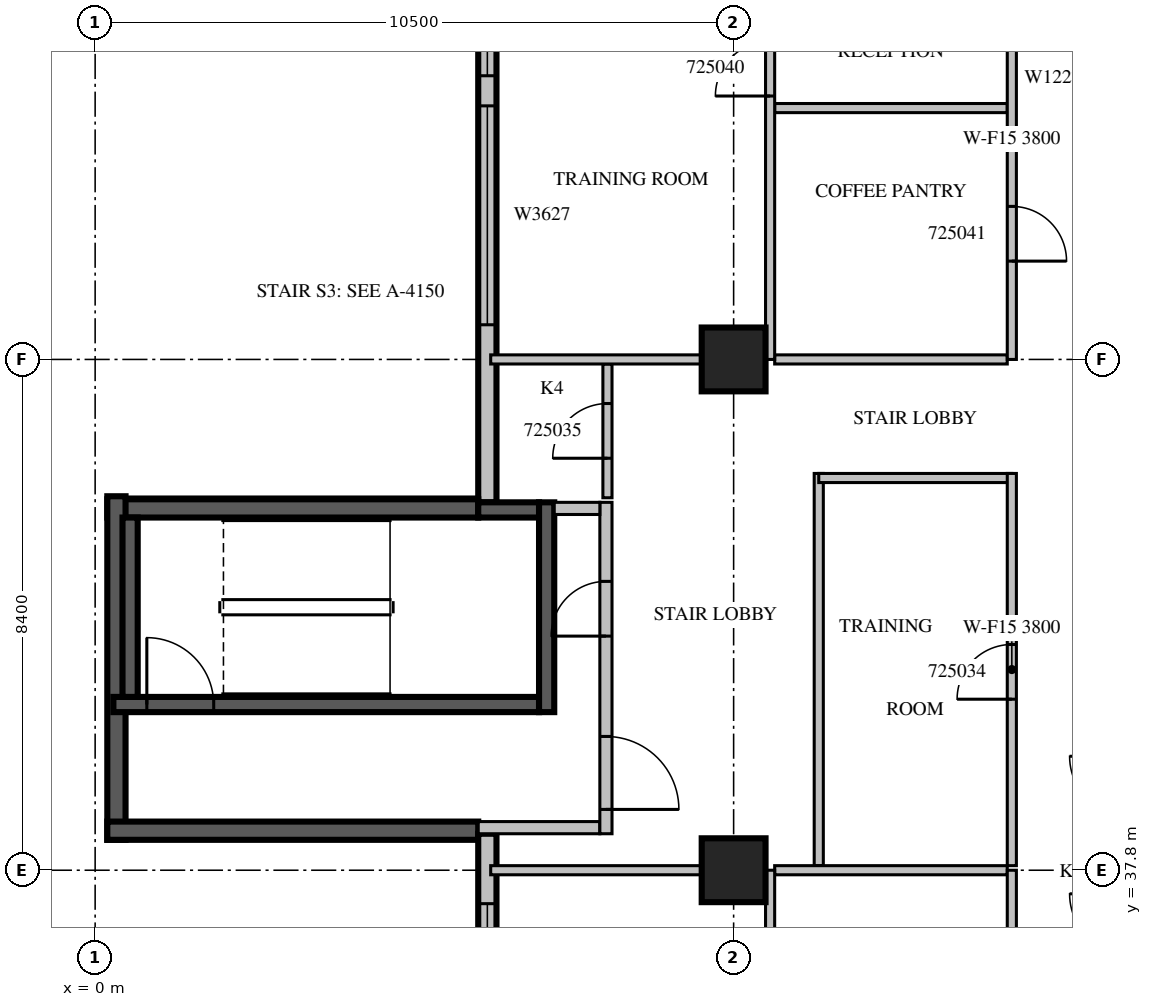
"""IFC4 building model, lengths in metres.
Left out: names, types, materials, properties, quantities, classifications, styles, units other than length and angle.
Written with IfcOpenShell. Run it as: python <this file> out.ifc"""

import sys

from ifc_helpers import new_model, si_unit, direction, frame, frame_2d, origin, origin_2d, place, context, subcontext, project, spatial, rectangle, extrude, source, transform, mapped, element, fill, save


model = new_model("IFC4")
c1 = context("Model", 3, precision=1e-05, world=origin(), true_north=direction((0.0, 1.0)))
c2 = subcontext(c1, "Body", "Model", "MODEL_VIEW")
j1 = project(units=[si_unit("LENGTHUNIT", "METRE"), si_unit("PLANEANGLEUNIT", "RADIAN")], contexts=[c1])
p1 = place(None, origin())
s1 = spatial("IfcSite", under=j1, at=p1, CompositionType="ELEMENT")
p2 = place(p1, origin())
s2 = spatial("IfcBuilding", under=s1, at=p2, CompositionType="ELEMENT")
p3 = place(p2, frame((0.0, 0.0, 116.1)))
s3 = spatial("IfcBuildingStorey", under=s2, at=p3, CompositionType="ELEMENT", Elevation=116.1)
m1 = source(origin(), c2, "Body", "SweptSolid", [
    extrude(rectangle(XDim=1.05, YDim=1.05, at=origin_2d()), origin(), (0.0, 0.0, 1.0), 4.2),
])
for number, where, z_axis, x_axis in (
    (1, (10.5, 37.8, 0.0), (0.0, 0.0, 1.0), (1.0, 0.0, 0.0)),
    (2, (10.5, 46.2, 0.0), (0.0, 0.0, 1.0), (1.0, 0.0, 0.0)),
):
    element("IfcColumn", number, at=place(p3, frame(where, z_axis=z_axis, x_axis=x_axis)), inside=s3, PredefinedType="COLUMN", context=c2, shape_type="MappedRepresentation", body=[
        mapped(m1, transform((0.0, 0.0, 0.0), scale=1.0)),
    ])
m2 = source(origin(), c2, "Body", "SweptSolid", [
    extrude(rectangle(XDim=9.91, YDim=0.3, at=frame_2d((4.955, 0.0))), origin(), (0.0, 0.0, 1.0), 3.8),
])
p4 = place(p3, frame((6.45, 53.76, 0.0), z_axis=(0.0, 0.0, 1.0), x_axis=(0.0, -1.0, 0.0)))
e3 = element("IfcWall", 3, at=p4, inside=s3, PredefinedType="STANDARD", context=c2, shape_type="MappedRepresentation", body=[
    mapped(m2, transform((0.0, 0.0, 0.0), scale=1.0)),
])
m3 = source(origin(), c2, "Body", "SweptSolid", [
    extrude(rectangle(XDim=3.6, YDim=2.7, at=frame_2d((1.8, 1.35))), frame((0.0, 0.16, 0.0), z_axis=(0.0, -1.0, 0.0), x_axis=(1.0, 0.0, 0.0)), (0.0, 0.0, 1.0), 0.32),
])
p5 = place(p4, frame((3.39, 0.0, 0.6)))
e4 = element("IfcOpeningElement", 4, at=p5, cuts=e3, PredefinedType="OPENING", context=c2, shape_type="MappedRepresentation", body=[
    mapped(m3, transform((0.0, 0.0, 0.0), scale=1.0)),
])
m4 = source(origin(), c2, "Body", "SweptSolid", [
    extrude(rectangle(XDim=2.4, YDim=2.7, at=frame_2d((1.2, 1.35))), frame((0.0, 0.16, 0.0), z_axis=(0.0, -1.0, 0.0), x_axis=(1.0, 0.0, 0.0)), (0.0, 0.0, 1.0), 0.32),
])
p6 = place(p4, frame((0.495, 0.0, 0.6)))
e5 = element("IfcOpeningElement", 5, at=p6, cuts=e3, PredefinedType="OPENING", context=c2, shape_type="MappedRepresentation", body=[
    mapped(m4, transform((0.0, 0.0, 0.0), scale=1.0)),
])
m5 = source(origin(), c2, "Body", "SweptSolid", [
    extrude(rectangle(XDim=6.1, YDim=0.3, at=frame_2d((3.05, 0.0))), origin(), (0.0, 0.0, 1.0), 3.8),
])
p7 = place(p3, frame((6.3, 43.75, 0.0), z_axis=(0.0, 0.0, 1.0), x_axis=(-1.0, 0.0, 0.0)))
e6 = element("IfcWall", 6, at=p7, inside=s3, PredefinedType="SOLIDWALL", context=c2, shape_type="MappedRepresentation", body=[
    mapped(m5, transform((0.0, 0.0, 0.0), scale=1.0)),
])
m6 = source(origin(), c2, "Body", "SweptSolid", [
    extrude(rectangle(XDim=5.65, YDim=0.3, at=frame_2d((2.825, 0.0))), origin(), (0.0, 0.0, 1.0), 3.8),
])
p8 = place(p3, frame((0.35, 43.95, 0.0), z_axis=(0.0, 0.0, 1.0), x_axis=(0.0, -1.0, 0.0)))
e7 = element("IfcWall", 7, at=p8, inside=s3, PredefinedType="SOLIDWALL", context=c2, shape_type="MappedRepresentation", body=[
    mapped(m6, transform((0.0, 0.0, 0.0), scale=1.0)),
])
p9 = place(p3, frame((0.2, 38.45, 0.0), z_axis=(0.0, 0.0, 1.0), x_axis=(1.0, 0.0, 0.0)))
e8 = element("IfcWall", 8, at=p9, inside=s3, PredefinedType="SOLIDWALL", context=c2, shape_type="MappedRepresentation", body=[
    mapped(m5, transform((0.0, 0.0, 0.0), scale=1.0)),
])
m7 = source(origin(), c2, "Body", "SweptSolid", [
    extrude(rectangle(XDim=16.4, YDim=0.3, at=frame_2d((8.2, 0.0))), origin(), (0.0, 0.0, 1.0), 3.8),
])
p10 = place(p3, frame((6.45, 38.4, 0.0), z_axis=(0.0, 0.0, 1.0), x_axis=(0.0, -1.0, 0.0)))
e9 = element("IfcWall", 9, at=p10, inside=s3, PredefinedType="STANDARD", context=c2, shape_type="MappedRepresentation", body=[
    mapped(m7, transform((0.0, 0.0, 0.0), scale=1.0)),
])
m8 = source(origin(), c2, "Body", "SweptSolid", [
    extrude(rectangle(XDim=1.8, YDim=2.7, at=frame_2d((0.9, 1.35))), frame((0.0, 0.16, 0.0), z_axis=(0.0, -1.0, 0.0), x_axis=(1.0, 0.0, 0.0)), (0.0, 0.0, 1.0), 0.32),
])
p11 = place(p10, frame((1.15, 0.0, 0.6)))
e10 = element("IfcOpeningElement", 10, at=p11, cuts=e9, PredefinedType="OPENING", context=c2, shape_type="MappedRepresentation", body=[
    mapped(m8, transform((0.0, 0.0, 0.0), scale=1.0)),
])
p12 = place(p10, frame((5.162, 0.0, 0.6)))
e11 = element("IfcOpeningElement", 11, at=p12, cuts=e9, PredefinedType="OPENING", context=c2, shape_type="MappedRepresentation", body=[
    mapped(m8, transform((0.0, 0.0, 0.0), scale=1.0)),
])
p13 = place(p10, frame((9.438, 0.0, 0.6)))
e12 = element("IfcOpeningElement", 12, at=p13, cuts=e9, PredefinedType="OPENING", context=c2, shape_type="MappedRepresentation", body=[
    mapped(m8, transform((0.0, 0.0, 0.0), scale=1.0)),
])
m9 = source(origin(), c2, "Body", "SweptSolid", [
    extrude(rectangle(XDim=3.0, YDim=2.7, at=frame_2d((1.5, 1.35))), frame((0.0, 0.16, 0.0), z_axis=(0.0, -1.0, 0.0), x_axis=(1.0, 0.0, 0.0)), (0.0, 0.0, 1.0), 0.32),
])
p14 = place(p10, frame((12.7, 0.0, 0.6)))
e13 = element("IfcOpeningElement", 13, at=p14, cuts=e9, PredefinedType="OPENING", context=c2, shape_type="MappedRepresentation", body=[
    mapped(m9, transform((0.0, 0.0, 0.0), scale=1.0)),
])
m10 = source(origin(), c2, "Body", "SweptSolid", [
    extrude(rectangle(XDim=7.0, YDim=0.25, at=frame_2d((3.5, 0.0))), origin(), (0.0, 0.0, 1.0), 3.8),
])
p15 = place(p3, frame((0.3, 40.525, 0.0), z_axis=(0.0, 0.0, 1.0), x_axis=(1.0, 0.0, 0.0)))
e14 = element("IfcWall", 14, at=p15, inside=s3, PredefinedType="SOLIDWALL", context=c2, shape_type="MappedRepresentation", body=[
    mapped(m10, transform((0.0, 0.0, 0.0), scale=1.0)),
])
m11 = source(origin(), c2, "Body", "SweptSolid", [
    extrude(rectangle(XDim=1.1, YDim=2.1, at=frame_2d((0.55, 1.05))), frame((0.0, 0.135, 0.0), z_axis=(0.0, -1.0, 0.0), x_axis=(1.0, 0.0, 0.0)), (0.0, 0.0, 1.0), 0.27),
])
p16 = place(p15, frame((0.55, 0.0, 0.0)))
e15 = element("IfcOpeningElement", 15, at=p16, cuts=e14, PredefinedType="OPENING", context=c2, shape_type="MappedRepresentation", body=[
    mapped(m11, transform((0.0, 0.0, 0.0), scale=1.0)),
])
m12 = source(origin(), c2, "Body", "SweptSolid", [
    extrude(rectangle(XDim=1.0, YDim=0.25, at=frame_2d((0.5, 0.0))), origin(), (0.0, 0.0, 1.0), 3.8),
])
p17 = place(p3, frame((6.3, 43.725, 0.0), z_axis=(0.0, 0.0, 1.0), x_axis=(1.0, 0.0, 0.0)))
e16 = element("IfcWall", 16, at=p17, inside=s3, PredefinedType="SOLIDWALL", context=c2, shape_type="MappedRepresentation", body=[
    mapped(m12, transform((0.0, 0.0, 0.0), scale=1.0)),
])
m13 = source(origin(), c2, "Body", "SweptSolid", [
    extrude(rectangle(XDim=3.45, YDim=0.25, at=frame_2d((1.725, 0.0))), origin(), (0.0, 0.0, 1.0), 3.8),
])
p18 = place(p3, frame((7.425, 40.4, 0.0), z_axis=(0.0, 0.0, 1.0), x_axis=(0.0, 1.0, 0.0)))
e17 = element("IfcWall", 17, at=p18, inside=s3, PredefinedType="SOLIDWALL", context=c2, shape_type="MappedRepresentation", body=[
    mapped(m13, transform((0.0, 0.0, 0.0), scale=1.0)),
])
m14 = source(origin(), c2, "Body", "SweptSolid", [
    extrude(rectangle(XDim=2.95, YDim=0.25, at=frame_2d((1.475, 0.0))), origin(), (0.0, 0.0, 1.0), 3.8),
])
p19 = place(p3, frame((0.575, 40.65, 0.0), z_axis=(0.0, 0.0, 1.0), x_axis=(0.0, 1.0, 0.0)))
e18 = element("IfcWall", 18, at=p19, inside=s3, PredefinedType="SOLIDWALL", context=c2, shape_type="MappedRepresentation", body=[
    mapped(m14, transform((0.0, 0.0, 0.0), scale=1.0)),
])
m15 = source(origin(), c2, "Body", "SweptSolid", [
    extrude(rectangle(XDim=2.0, YDim=0.2, at=frame_2d((1.0, 0.0))), origin(), (0.0, 0.0, 1.0), 3.8),
])
p20 = place(p3, frame((6.3, 38.5, 0.0), z_axis=(0.0, 0.0, 1.0), x_axis=(1.0, 0.0, 0.0)))
e19 = element("IfcWall", 19, at=p20, inside=s3, PredefinedType="PARTITIONING", context=c2, shape_type="MappedRepresentation", body=[
    mapped(m15, transform((0.0, 0.0, 0.0), scale=1.0)),
])
m16 = source(origin(), c2, "Body", "SweptSolid", [
    extrude(rectangle(XDim=5.45, YDim=0.2, at=frame_2d((2.725, 0.0))), origin(), (0.0, 0.0, 1.0), 3.8),
])
p21 = place(p3, frame((8.4, 38.4, 0.0), z_axis=(0.0, 0.0, 1.0), x_axis=(0.0, 1.0, 0.0)))
e20 = element("IfcWall", 20, at=p21, inside=s3, PredefinedType="PARTITIONING", context=c2, shape_type="MappedRepresentation", body=[
    mapped(m16, transform((0.0, 0.0, 0.0), scale=1.0)),
])
m17 = source(origin(), c2, "Body", "SweptSolid", [
    extrude(rectangle(XDim=1.2, YDim=2.1, at=frame_2d((0.6, 1.05))), frame((0.0, 0.11, 0.0), z_axis=(0.0, -1.0, 0.0), x_axis=(1.0, 0.0, 0.0)), (0.0, 0.0, 1.0), 0.22),
])
p22 = place(p21, frame((0.4, 0.0, 0.0)))
e21 = element("IfcOpeningElement", 21, at=p22, cuts=e20, PredefinedType="OPENING", context=c2, shape_type="MappedRepresentation", body=[
    mapped(m17, transform((0.0, 0.0, 0.0), scale=1.0)),
])
m18 = source(origin(), c2, "Body", "SweptSolid", [
    extrude(rectangle(XDim=0.9, YDim=2.1, at=frame_2d((0.45, 1.05))), frame((0.0, 0.11, 0.0), z_axis=(0.0, -1.0, 0.0), x_axis=(1.0, 0.0, 0.0)), (0.0, 0.0, 1.0), 0.22),
])
p23 = place(p21, frame((3.25, 0.0, 0.0)))
e22 = element("IfcOpeningElement", 22, at=p23, cuts=e20, PredefinedType="OPENING", context=c2, shape_type="MappedRepresentation", body=[
    mapped(m18, transform((0.0, 0.0, 0.0), scale=1.0)),
])
m19 = source(origin(), c2, "Body", "SweptSolid", [
    extrude(rectangle(XDim=0.75, YDim=0.2, at=frame_2d((0.375, 0.0))), origin(), (0.0, 0.0, 1.0), 3.8),
])
p24 = place(p3, frame((7.55, 43.75, 0.0), z_axis=(0.0, 0.0, 1.0), x_axis=(1.0, 0.0, 0.0)))
e23 = element("IfcWall", 23, at=p24, inside=s3, PredefinedType="PARTITIONING", context=c2, shape_type="MappedRepresentation", body=[
    mapped(m19, transform((0.0, 0.0, 0.0), scale=1.0)),
])
m20 = source(origin(), c2, "Body", "SweptSolid", [
    extrude(rectangle(XDim=6.45, YDim=0.15, at=frame_2d((3.225, 0.0))), origin(), (0.0, 0.0, 1.0), 3.8),
])
p25 = place(p3, frame((11.9, 44.325, 0.0), z_axis=(0.0, 0.0, 1.0), x_axis=(0.0, -1.0, 0.0)))
e24 = element("IfcWall", 24, at=p25, inside=s3, PredefinedType="PARTITIONING", context=c2, shape_type="MappedRepresentation", body=[
    mapped(m20, transform((0.0, 0.0, 0.0), scale=1.0)),
])
m21 = source(origin(), c2, "Body", "SweptSolid", [
    extrude(rectangle(XDim=3.175, YDim=0.15, at=frame_2d((1.587, 0.0))), origin(), (0.0, 0.0, 1.0), 3.8),
])
p26 = place(p3, frame((15.075, 44.25, 0.0), z_axis=(0.0, 0.0, 1.0), x_axis=(-1.0, 0.0, 0.0)))
e25 = element("IfcWall", 25, at=p26, inside=s3, PredefinedType="PARTITIONING", context=c2, shape_type="MappedRepresentation", body=[
    mapped(m21, transform((0.0, 0.0, 0.0), scale=1.0)),
])
p27 = place(p3, frame((15.075, 37.875, 0.0), z_axis=(0.0, 0.0, 1.0), x_axis=(0.0, 1.0, 0.0)))
e26 = element("IfcWall", 26, at=p27, inside=s3, PredefinedType="PARTITIONING", context=c2, shape_type="MappedRepresentation", body=[
    mapped(m20, transform((0.0, 0.0, 0.0), scale=1.0)),
])
m22 = source(origin(), c2, "Body", "SweptSolid", [
    extrude(rectangle(XDim=0.9, YDim=2.1, at=frame_2d((0.45, 1.05))), frame((0.0, 0.085, 0.0), z_axis=(0.0, -1.0, 0.0), x_axis=(1.0, 0.0, 0.0)), (0.0, 0.0, 1.0), 0.17),
])
p28 = place(p27, frame((2.737, 0.0, 0.0)))
e27 = element("IfcOpeningElement", 27, at=p28, cuts=e26, PredefinedType="OPENING", context=c2, shape_type="MappedRepresentation", body=[
    mapped(m22, transform((0.0, 0.0, 0.0), scale=1.0)),
])
m23 = source(origin(), c2, "Body", "SweptSolid", [
    extrude(rectangle(XDim=2.2, YDim=0.15, at=frame_2d((1.1, 0.0))), origin(), (0.0, 0.0, 1.0), 3.8),
])
p29 = place(p3, frame((8.425, 43.925, 0.0), z_axis=(0.0, 0.0, 1.0), x_axis=(0.0, 1.0, 0.0)))
e28 = element("IfcWall", 28, at=p29, inside=s3, PredefinedType="PARTITIONING", context=c2, shape_type="MappedRepresentation", body=[
    mapped(m23, transform((0.0, 0.0, 0.0), scale=1.0)),
])
p30 = place(p29, frame((0.65, 0.0, 0.0)))
e29 = element("IfcOpeningElement", 29, at=p30, cuts=e28, PredefinedType="OPENING", context=c2, shape_type="MappedRepresentation", body=[
    mapped(m22, transform((0.0, 0.0, 0.0), scale=1.0)),
])
m24 = source(origin(), c2, "Body", "SweptSolid", [
    extrude(rectangle(XDim=3.471, YDim=0.15, at=frame_2d((1.736, 0.0))), origin(), (0.0, 0.0, 1.0), 3.8),
])
p31 = place(p3, frame((9.976, 37.8, 0.0), z_axis=(0.0, 0.0, 1.0), x_axis=(-1.0, 0.0, 0.0)))
e30 = element("IfcWall", 30, at=p31, inside=s3, PredefinedType="PARTITIONING", context=c2, shape_type="MappedRepresentation", body=[
    mapped(m24, transform((0.0, 0.0, 0.0), scale=1.0)),
])
m25 = source(origin(), c2, "Body", "SweptSolid", [
    extrude(rectangle(XDim=3.825, YDim=0.15, at=frame_2d((1.913, 0.0))), origin(), (0.0, 0.0, 1.0), 3.8),
])
p32 = place(p3, frame((15.0, 37.8, 0.0), z_axis=(0.0, 0.0, 1.0), x_axis=(-1.0, 0.0, 0.0)))
e31 = element("IfcWall", 31, at=p32, inside=s3, PredefinedType="PARTITIONING", context=c2, shape_type="MappedRepresentation", body=[
    mapped(m25, transform((0.0, 0.0, 0.0), scale=1.0)),
])
m26 = source(origin(), c2, "Body", "SweptSolid", [
    extrude(rectangle(XDim=8.4, YDim=0.15, at=frame_2d((4.2, 0.0))), origin(), (0.0, 0.0, 1.0), 3.3),
])
p33 = place(p3, frame((11.1, 29.4, 0.0), z_axis=(0.0, 0.0, 1.0), x_axis=(0.0, 1.0, 0.0)))
e32 = element("IfcWall", 32, at=p33, inside=s3, PredefinedType="PARTITIONING", context=c2, shape_type="MappedRepresentation", body=[
    mapped(m26, transform((0.0, 0.0, 0.0), scale=1.0)),
])
p34 = place(p33, frame((1.925, 0.0, 0.0)))
e33 = element("IfcOpeningElement", 33, at=p34, cuts=e32, PredefinedType="OPENING", context=c2, shape_type="MappedRepresentation", body=[
    mapped(m22, transform((0.0, 0.0, 0.0), scale=1.0)),
])
p35 = place(p33, frame((5.625, 0.0, 0.0)))
e34 = element("IfcOpeningElement", 34, at=p35, cuts=e32, PredefinedType="OPENING", context=c2, shape_type="MappedRepresentation", body=[
    mapped(m22, transform((0.0, 0.0, 0.0), scale=1.0)),
])
p36 = place(p3, frame((15.0, 50.334, 0.0), z_axis=(0.0, 0.0, 1.0), x_axis=(-1.0, 0.0, 0.0)))
e35 = element("IfcWall", 35, at=p36, inside=s3, PredefinedType="PARTITIONING", context=c2, shape_type="MappedRepresentation", body=[
    mapped(m25, transform((0.0, 0.0, 0.0), scale=1.0)),
])
p37 = place(p3, frame((9.976, 46.2, 0.0), z_axis=(0.0, 0.0, 1.0), x_axis=(-1.0, 0.0, 0.0)))
e36 = element("IfcWall", 36, at=p37, inside=s3, PredefinedType="PARTITIONING", context=c2, shape_type="MappedRepresentation", body=[
    mapped(m24, transform((0.0, 0.0, 0.0), scale=1.0)),
])
p38 = place(p3, frame((15.0, 46.2, 0.0), z_axis=(0.0, 0.0, 1.0), x_axis=(-1.0, 0.0, 0.0)))
e37 = element("IfcWall", 37, at=p38, inside=s3, PredefinedType="PARTITIONING", context=c2, shape_type="MappedRepresentation", body=[
    mapped(m25, transform((0.0, 0.0, 0.0), scale=1.0)),
])
m27 = source(origin(), c2, "Body", "SweptSolid", [
    extrude(rectangle(XDim=7.26, YDim=0.15, at=frame_2d((3.63, 0.0))), origin(), (0.0, 0.0, 1.0), 3.8),
])
p39 = place(p3, frame((11.1, 46.2, 0.0), z_axis=(0.0, 0.0, 1.0), x_axis=(0.0, 1.0, 0.0)))
e38 = element("IfcWall", 38, at=p39, inside=s3, PredefinedType="PARTITIONING", context=c2, shape_type="MappedRepresentation", body=[
    mapped(m27, transform((0.0, 0.0, 0.0), scale=1.0)),
])
p40 = place(p39, frame((4.332, 0.0, 0.0)))
e39 = element("IfcOpeningElement", 39, at=p40, cuts=e38, PredefinedType="OPENING", context=c2, shape_type="MappedRepresentation", body=[
    mapped(m22, transform((0.0, 0.0, 0.0), scale=1.0)),
])
p41 = place(p3, frame((15.075, 29.4, 0.0), z_axis=(0.0, 0.0, 1.0), x_axis=(0.0, 1.0, 0.0)))
e40 = element("IfcWall", 40, at=p41, inside=s3, PredefinedType="PARTITIONING", context=c2, shape_type="MappedRepresentation", body=[
    mapped(m26, transform((0.0, 0.0, 0.0), scale=1.0)),
])
m28 = source(origin(), c2, "Body", "SweptSolid", [
    extrude(rectangle(XDim=1.2, YDim=2.1, at=frame_2d((0.6, 1.05))), frame((0.0, 0.085, 0.0), z_axis=(0.0, -1.0, 0.0), x_axis=(1.0, 0.0, 0.0)), (0.0, 0.0, 1.0), 0.17),
])
p42 = place(p41, frame((3.6, 0.0, 0.0)))
e41 = element("IfcOpeningElement", 41, at=p42, cuts=e40, PredefinedType="OPENING", context=c2, shape_type="MappedRepresentation", body=[
    mapped(m28, transform((0.0, 0.0, 0.0), scale=1.0)),
])
p43 = place(p3, frame((15.075, 46.2, 0.0), z_axis=(0.0, 0.0, 1.0), x_axis=(0.0, 1.0, 0.0)))
e42 = element("IfcWall", 42, at=p43, inside=s3, PredefinedType="PARTITIONING", context=c2, shape_type="MappedRepresentation", body=[
    mapped(m27, transform((0.0, 0.0, 0.0), scale=1.0)),
])
m29 = source(origin(), c2, "Body", "SweptSolid", [
    extrude(rectangle(XDim=1.1, YDim=2.1, at=frame_2d((0.55, 1.05))), frame((0.0, 0.085, 0.0), z_axis=(0.0, -1.0, 0.0), x_axis=(1.0, 0.0, 0.0)), (0.0, 0.0, 1.0), 0.17),
])
p44 = place(p43, frame((5.184, 0.0, 0.0)))
e43 = element("IfcOpeningElement", 43, at=p44, cuts=e42, PredefinedType="OPENING", context=c2, shape_type="MappedRepresentation", body=[
    mapped(m29, transform((0.0, 0.0, 0.0), scale=1.0)),
])
p45 = place(p43, frame((1.617, 0.0, 0.0)))
e44 = element("IfcOpeningElement", 44, at=p45, cuts=e42, PredefinedType="OPENING", context=c2, shape_type="MappedRepresentation", body=[
    mapped(m22, transform((0.0, 0.0, 0.0), scale=1.0)),
])
m30 = source(origin(), c2, "Body", "SweptSolid", [
    extrude(rectangle(XDim=3.6, YDim=2.7, at=frame_2d((1.8, 1.35))), frame((0.0, 0.03, 0.0), z_axis=(0.0, -1.0, 0.0), x_axis=(1.0, 0.0, 0.0)), (0.0, 0.0, 1.0), 0.06),
])
p46 = place(p5, origin())
e45 = element("IfcWindow", 45, at=p46, inside=s3, PartitioningType="SINGLE_PANEL", PredefinedType="WINDOW", context=c2, shape_type="MappedRepresentation", body=[
    mapped(m30, transform((0.0, 0.0, 0.0), scale=1.0)),
])
fill(e4, e45)
m31 = source(origin(), c2, "Body", "SweptSolid", [
    extrude(rectangle(XDim=2.4, YDim=2.7, at=frame_2d((1.2, 1.35))), frame((0.0, 0.03, 0.0), z_axis=(0.0, -1.0, 0.0), x_axis=(1.0, 0.0, 0.0)), (0.0, 0.0, 1.0), 0.06),
])
p47 = place(p6, origin())
e46 = element("IfcWindow", 46, at=p47, inside=s3, PartitioningType="SINGLE_PANEL", PredefinedType="WINDOW", context=c2, shape_type="MappedRepresentation", body=[
    mapped(m31, transform((0.0, 0.0, 0.0), scale=1.0)),
])
fill(e5, e46)
m32 = source(origin(), c2, "Body", "SweptSolid", [
    extrude(rectangle(XDim=1.8, YDim=2.7, at=frame_2d((0.9, 1.35))), frame((0.0, 0.03, 0.0), z_axis=(0.0, -1.0, 0.0), x_axis=(1.0, 0.0, 0.0)), (0.0, 0.0, 1.0), 0.06),
])
p48 = place(p11, origin())
e47 = element("IfcWindow", 47, at=p48, inside=s3, PartitioningType="SINGLE_PANEL", PredefinedType="WINDOW", context=c2, shape_type="MappedRepresentation", body=[
    mapped(m32, transform((0.0, 0.0, 0.0), scale=1.0)),
])
fill(e10, e47)
m33 = source(origin(), c2, "Body", "SweptSolid", [
    extrude(rectangle(XDim=1.1, YDim=2.1, at=frame_2d((0.55, 1.05))), frame((0.0, 0.025, 0.0), z_axis=(0.0, -1.0, 0.0), x_axis=(1.0, 0.0, 0.0)), (0.0, 0.0, 1.0), 0.05),
])
p49 = place(p16, origin())
e48 = element("IfcDoor", 48, at=p49, inside=s3, OperationType="SINGLE_SWING_LEFT", PredefinedType="DOOR", context=c2, shape_type="MappedRepresentation", body=[
    mapped(m33, transform((0.0, 0.0, 0.0), scale=1.0)),
])
fill(e15, e48)
m34 = source(origin(), c2, "Body", "SweptSolid", [
    extrude(rectangle(XDim=1.2, YDim=2.1, at=frame_2d((0.6, 1.05))), frame((0.0, 0.025, 0.0), z_axis=(0.0, -1.0, 0.0), x_axis=(1.0, 0.0, 0.0)), (0.0, 0.0, 1.0), 0.05),
])
p50 = place(p22, origin())
e49 = element("IfcDoor", 49, at=p50, inside=s3, OperationType="SINGLE_SWING_RIGHT", PredefinedType="DOOR", context=c2, shape_type="MappedRepresentation", body=[
    mapped(m34, transform((0.0, 0.0, 0.0), scale=1.0)),
])
fill(e21, e49)
m35 = source(origin(), c2, "Body", "SweptSolid", [
    extrude(rectangle(XDim=0.9, YDim=2.1, at=frame_2d((0.45, 1.05))), frame((0.0, 0.025, 0.0), z_axis=(0.0, -1.0, 0.0), x_axis=(1.0, 0.0, 0.0)), (0.0, 0.0, 1.0), 0.05),
])
p51 = place(p23, origin())
e50 = element("IfcDoor", 50, at=p51, inside=s3, OperationType="SINGLE_SWING_LEFT", PredefinedType="DOOR", context=c2, shape_type="MappedRepresentation", body=[
    mapped(m35, transform((0.0, 0.0, 0.0), scale=1.0)),
])
fill(e22, e50)
p52 = place(p28, origin())
e51 = element("IfcDoor", 51, at=p52, inside=s3, OperationType="SINGLE_SWING_LEFT", PredefinedType="DOOR", context=c2, shape_type="MappedRepresentation", body=[
    mapped(m35, transform((0.0, 0.0, 0.0), scale=1.0)),
])
fill(e27, e51)
p53 = place(p30, origin())
e52 = element("IfcDoor", 52, at=p53, inside=s3, OperationType="SINGLE_SWING_LEFT", PredefinedType="DOOR", context=c2, shape_type="MappedRepresentation", body=[
    mapped(m35, transform((0.0, 0.0, 0.0), scale=1.0)),
])
fill(e29, e52)
p54 = place(p40, origin())
e53 = element("IfcDoor", 53, at=p54, inside=s3, OperationType="SINGLE_SWING_LEFT", PredefinedType="DOOR", context=c2, shape_type="MappedRepresentation", body=[
    mapped(m35, transform((0.0, 0.0, 0.0), scale=1.0)),
])
fill(e39, e53)
p55 = place(p45, origin())
e54 = element("IfcDoor", 54, at=p55, inside=s3, OperationType="SINGLE_SWING_RIGHT", PredefinedType="DOOR", context=c2, shape_type="MappedRepresentation", body=[
    mapped(m35, transform((0.0, 0.0, 0.0), scale=1.0)),
])
fill(e44, e54)
save(model, sys.argv[1])
